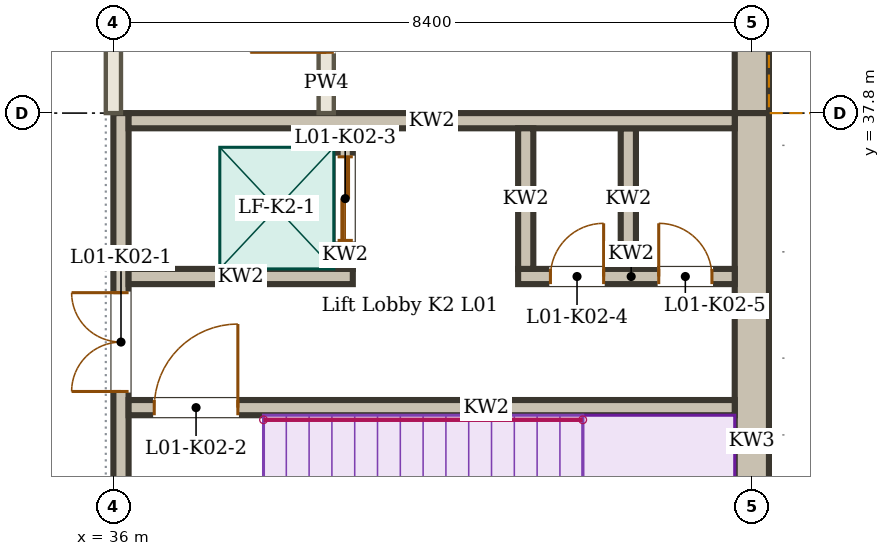
"""IFC4 building model, lengths in metres.
Left out: names, types, materials, properties, quantities, classifications, styles, units other than length and angle.
Written with IfcOpenShell. Run it as: python <this file> out.ifc"""

import sys

from ifc_helpers import new_model, si_unit, direction, frame, frame_2d, origin, place, context, subcontext, project, spatial, rectangle, extrude, element, fill, save


model = new_model("IFC4")
c1 = context("Model", 3, precision=1e-05, world=origin(), true_north=direction((0.0, 1.0)))
c2 = subcontext(c1, "Body", "Model", "MODEL_VIEW")
j1 = project(units=[si_unit("LENGTHUNIT", "METRE"), si_unit("PLANEANGLEUNIT", "RADIAN")], contexts=[c1])
p1 = place(None, origin())
s1 = spatial("IfcSite", under=j1, at=p1, CompositionType="ELEMENT")
p2 = place(p1, origin())
s2 = spatial("IfcBuilding", under=s1, at=p2, CompositionType="ELEMENT")
p3 = place(p2, frame((0.0, 0.0, 4.5)))
s3 = spatial("IfcBuildingStorey", under=s2, at=p3, CompositionType="ELEMENT", Elevation=4.5)
p4 = place(p3, frame((44.4, 37.8, 0.0), z_axis=(0.0, 0.0, 1.0), x_axis=(0.0, 1.0, 0.0)))
e1 = element("IfcWall", 1, at=p4, inside=s3, PredefinedType="SOLIDWALL", context=c2, shape_type="SweptSolid", body=[
    extrude(rectangle(XDim=8.255, YDim=0.45, at=frame_2d((4.127, 0.0))), origin(), (0.0, 0.0, 1.0), 4.05),
])
p5 = place(p4, frame((1.1, 0.0, 2.1)))
e2 = element("IfcOpeningElement", 2, at=p5, cuts=e1, PredefinedType="OPENING", context=c2, shape_type="SweptSolid", body=[
    extrude(rectangle(XDim=0.6, YDim=1.2, at=frame_2d((0.3, 0.6))), frame((0.0, 0.235, 0.0), z_axis=(0.0, -1.0, 0.0), x_axis=(1.0, 0.0, 0.0)), (0.0, 0.0, 1.0), 0.47),
])
p6 = place(p4, frame((3.9, 0.0, 2.1)))
e3 = element("IfcOpeningElement", 3, at=p6, cuts=e1, PredefinedType="OPENING", context=c2, shape_type="SweptSolid", body=[
    extrude(rectangle(XDim=0.6, YDim=1.2, at=frame_2d((0.3, 0.6))), frame((0.0, 0.235, 0.0), z_axis=(0.0, -1.0, 0.0), x_axis=(1.0, 0.0, 0.0)), (0.0, 0.0, 1.0), 0.47),
])
p7 = place(p4, frame((6.7, 0.0, 2.1)))
e4 = element("IfcOpeningElement", 4, at=p7, cuts=e1, PredefinedType="OPENING", context=c2, shape_type="SweptSolid", body=[
    extrude(rectangle(XDim=0.6, YDim=1.2, at=frame_2d((0.3, 0.6))), frame((0.0, 0.235, 0.0), z_axis=(0.0, -1.0, 0.0), x_axis=(1.0, 0.0, 0.0)), (0.0, 0.0, 1.0), 0.47),
])
p8 = place(p3, frame((36.0, 37.8, 0.0), z_axis=(0.0, 0.0, 1.0), x_axis=(0.0, 1.0, 0.0)))
e5 = element("IfcWall", 5, at=p8, inside=s3, PredefinedType="PARTITIONING", context=c2, shape_type="SweptSolid", body=[
    extrude(rectangle(XDim=8.25, YDim=0.2, at=frame_2d((4.125, 0.0))), origin(), (0.0, 0.0, 1.0), 4.044),
])
p9 = place(p8, frame((3.7, 0.0, 0.0)))
e6 = element("IfcOpeningElement", 6, at=p9, cuts=e5, PredefinedType="OPENING", context=c2, shape_type="SweptSolid", body=[
    extrude(rectangle(XDim=1.0, YDim=2.1, at=frame_2d((0.5, 1.05))), frame((0.0, 0.11, 0.0), z_axis=(0.0, -1.0, 0.0), x_axis=(1.0, 0.0, 0.0)), (0.0, 0.0, 1.0), 0.22),
])
p10 = place(p3, frame((38.8, 37.8, 0.0), z_axis=(0.0, 0.0, 1.0), x_axis=(0.0, 1.0, 0.0)))
e7 = element("IfcWall", 7, at=p10, inside=s3, PredefinedType="PARTITIONING", context=c2, shape_type="SweptSolid", body=[
    extrude(rectangle(XDim=2.725, YDim=0.2, at=frame_2d((1.362, 0.0))), origin(), (0.0, 0.0, 1.0), 4.35),
])
p11 = place(p10, frame((0.8, 0.0, 0.0)))
e8 = element("IfcOpeningElement", 8, at=p11, cuts=e7, PredefinedType="OPENING", context=c2, shape_type="SweptSolid", body=[
    extrude(rectangle(XDim=1.0, YDim=2.1, at=frame_2d((0.5, 1.05))), frame((0.0, 0.11, 0.0), z_axis=(0.0, -1.0, 0.0), x_axis=(1.0, 0.0, 0.0)), (0.0, 0.0, 1.0), 0.22),
])
p12 = place(p3, frame((36.1, 29.625, 0.0), z_axis=(0.0, 0.0, 1.0), x_axis=(0.0, 1.0, 0.0)))
e9 = element("IfcWall", 9, at=p12, inside=s3, PredefinedType="SOLIDWALL", context=c2, shape_type="SweptSolid", body=[
    extrude(rectangle(XDim=8.175, YDim=0.2, at=frame_2d((4.087, 0.0))), origin(), (0.0, 0.0, 1.0), 4.5),
])
p13 = place(p12, frame((4.512, 0.0, 0.0)))
e10 = element("IfcOpeningElement", 10, at=p13, cuts=e9, PredefinedType="OPENING", context=c2, shape_type="SweptSolid", body=[
    extrude(rectangle(XDim=1.3, YDim=2.1, at=frame_2d((0.65, 1.05))), frame((0.0, 0.11, 0.0), z_axis=(0.0, -1.0, 0.0), x_axis=(1.0, 0.0, 0.0)), (0.0, 0.0, 1.0), 0.22),
])
p14 = place(p3, frame((44.4, 29.175, 0.0), z_axis=(0.0, 0.0, 1.0), x_axis=(0.0, 1.0, 0.0)))
e11 = element("IfcWall", 11, at=p14, inside=s3, PredefinedType="SOLIDWALL", context=c2, shape_type="SweptSolid", body=[
    extrude(rectangle(XDim=8.625, YDim=0.45, at=frame_2d((4.312, 0.0))), origin(), (0.0, 0.0, 1.0), 4.5),
])
p15 = place(p3, frame((36.2, 37.7, 0.0), z_axis=(0.0, 0.0, 1.0), x_axis=(1.0, 0.0, 0.0)))
e12 = element("IfcWall", 12, at=p15, inside=s3, PredefinedType="SOLIDWALL", context=c2, shape_type="SweptSolid", body=[
    extrude(rectangle(XDim=7.975, YDim=0.2, at=frame_2d((3.988, 0.0))), origin(), (0.0, 0.0, 1.0), 4.5),
])
p16 = place(p3, frame((36.2, 33.925, 0.0), z_axis=(0.0, 0.0, 1.0), x_axis=(1.0, 0.0, 0.0)))
e13 = element("IfcWall", 13, at=p16, inside=s3, PredefinedType="SOLIDWALL", context=c2, shape_type="SweptSolid", body=[
    extrude(rectangle(XDim=7.975, YDim=0.2, at=frame_2d((3.988, 0.0))), origin(), (0.0, 0.0, 1.0), 4.5),
])
p17 = place(p16, frame((0.337, 0.0, 0.0)))
e14 = element("IfcOpeningElement", 14, at=p17, cuts=e13, PredefinedType="OPENING", context=c2, shape_type="SweptSolid", body=[
    extrude(rectangle(XDim=1.1, YDim=2.1, at=frame_2d((0.55, 1.05))), frame((0.0, 0.11, 0.0), z_axis=(0.0, -1.0, 0.0), x_axis=(1.0, 0.0, 0.0)), (0.0, 0.0, 1.0), 0.22),
])
p18 = place(p3, frame((36.2, 35.65, 0.0), z_axis=(0.0, 0.0, 1.0), x_axis=(1.0, 0.0, 0.0)))
e15 = element("IfcWall", 15, at=p18, inside=s3, PredefinedType="SOLIDWALL", context=c2, shape_type="SweptSolid", body=[
    extrude(rectangle(XDim=2.95, YDim=0.2, at=frame_2d((1.475, 0.0))), origin(), (0.0, 0.0, 1.0), 4.5),
])
p19 = place(p3, frame((41.325, 35.65, 0.0), z_axis=(0.0, 0.0, 1.0), x_axis=(1.0, 0.0, 0.0)))
e16 = element("IfcWall", 16, at=p19, inside=s3, PredefinedType="SOLIDWALL", context=c2, shape_type="SweptSolid", body=[
    extrude(rectangle(XDim=2.85, YDim=0.2, at=frame_2d((1.425, 0.0))), origin(), (0.0, 0.0, 1.0), 4.3),
])
p20 = place(p19, frame((0.425, 0.0, 0.0)))
e17 = element("IfcOpeningElement", 17, at=p20, cuts=e16, PredefinedType="OPENING", context=c2, shape_type="SweptSolid", body=[
    extrude(rectangle(XDim=0.7, YDim=2.1, at=frame_2d((0.35, 1.05))), frame((0.0, 0.11, 0.0), z_axis=(0.0, -1.0, 0.0), x_axis=(1.0, 0.0, 0.0)), (0.0, 0.0, 1.0), 0.22),
])
p21 = place(p19, frame((1.85, 0.0, 0.0)))
e18 = element("IfcOpeningElement", 18, at=p21, cuts=e16, PredefinedType="OPENING", context=c2, shape_type="SweptSolid", body=[
    extrude(rectangle(XDim=0.7, YDim=2.1, at=frame_2d((0.35, 1.05))), frame((0.0, 0.11, 0.0), z_axis=(0.0, -1.0, 0.0), x_axis=(1.0, 0.0, 0.0)), (0.0, 0.0, 1.0), 0.22),
])
p22 = place(p3, frame((39.05, 35.75, 0.0), z_axis=(0.0, 0.0, 1.0), x_axis=(0.0, 1.0, 0.0)))
e19 = element("IfcWall", 19, at=p22, inside=s3, PredefinedType="SOLIDWALL", context=c2, shape_type="SweptSolid", body=[
    extrude(rectangle(XDim=1.85, YDim=0.2, at=frame_2d((0.925, 0.0))), origin(), (0.0, 0.0, 1.0), 4.5),
])
p23 = place(p22, frame((0.375, 0.0, 0.0)))
e20 = element("IfcOpeningElement", 20, at=p23, cuts=e19, PredefinedType="OPENING", context=c2, shape_type="SweptSolid", body=[
    extrude(rectangle(XDim=1.1, YDim=2.1, at=frame_2d((0.55, 1.05))), frame((0.0, 0.11, 0.0), z_axis=(0.0, -1.0, 0.0), x_axis=(1.0, 0.0, 0.0)), (0.0, 0.0, 1.0), 0.22),
])
for number, where, z_axis, x_axis in (
    (21, (41.425, 35.75, 0.0), (0.0, 0.0, 1.0), (0.0, 1.0, 0.0)),
    (22, (42.775, 35.75, 0.0), (0.0, 0.0, 1.0), (0.0, 1.0, 0.0)),
):
    element("IfcWall", number, at=place(p3, frame(where, z_axis=z_axis, x_axis=x_axis)), inside=s3, PredefinedType="SOLIDWALL", context=c2, shape_type="SweptSolid", body=[
        extrude(rectangle(XDim=1.85, YDim=0.2, at=frame_2d((0.925, 0.0))), origin(), (0.0, 0.0, 1.0), 4.3),
    ])
p24 = place(p13, origin())
e23 = element("IfcDoor", 23, at=p24, inside=s3, OperationType="DOUBLE_DOOR_DOUBLE_SWING", PredefinedType="DOOR", context=c2, shape_type="SweptSolid", body=[
    extrude(rectangle(XDim=1.3, YDim=2.1, at=frame_2d((0.65, 1.05))), frame((0.0, 0.025, 0.0), z_axis=(0.0, -1.0, 0.0), x_axis=(1.0, 0.0, 0.0)), (0.0, 0.0, 1.0), 0.05),
])
fill(e10, e23)
p25 = place(p17, origin())
e24 = element("IfcDoor", 24, at=p25, inside=s3, OperationType="SINGLE_SWING_RIGHT", PredefinedType="DOOR", context=c2, shape_type="SweptSolid", body=[
    extrude(rectangle(XDim=1.1, YDim=2.1, at=frame_2d((0.55, 1.05))), frame((0.0, 0.025, 0.0), z_axis=(0.0, -1.0, 0.0), x_axis=(1.0, 0.0, 0.0)), (0.0, 0.0, 1.0), 0.05),
])
fill(e14, e24)
p26 = place(p23, origin())
e25 = element("IfcDoor", 25, at=p26, inside=s3, OperationType="DOUBLE_DOOR_SLIDING", PredefinedType="DOOR", context=c2, shape_type="SweptSolid", body=[
    extrude(rectangle(XDim=1.1, YDim=2.1, at=frame_2d((0.55, 1.05))), frame((0.0, 0.025, 0.0), z_axis=(0.0, -1.0, 0.0), x_axis=(1.0, 0.0, 0.0)), (0.0, 0.0, 1.0), 0.05),
])
fill(e20, e25)
p27 = place(p20, origin())
e26 = element("IfcDoor", 26, at=p27, inside=s3, OperationType="SINGLE_SWING_RIGHT", PredefinedType="DOOR", context=c2, shape_type="SweptSolid", body=[
    extrude(rectangle(XDim=0.7, YDim=2.1, at=frame_2d((0.35, 1.05))), frame((0.0, 0.025, 0.0), z_axis=(0.0, -1.0, 0.0), x_axis=(1.0, 0.0, 0.0)), (0.0, 0.0, 1.0), 0.05),
])
fill(e17, e26)
p28 = place(p21, origin())
e27 = element("IfcDoor", 27, at=p28, inside=s3, OperationType="SINGLE_SWING_LEFT", PredefinedType="DOOR", context=c2, shape_type="SweptSolid", body=[
    extrude(rectangle(XDim=0.7, YDim=2.1, at=frame_2d((0.35, 1.05))), frame((0.0, 0.025, 0.0), z_axis=(0.0, -1.0, 0.0), x_axis=(1.0, 0.0, 0.0)), (0.0, 0.0, 1.0), 0.05),
])
fill(e18, e27)
save(model, sys.argv[1])
